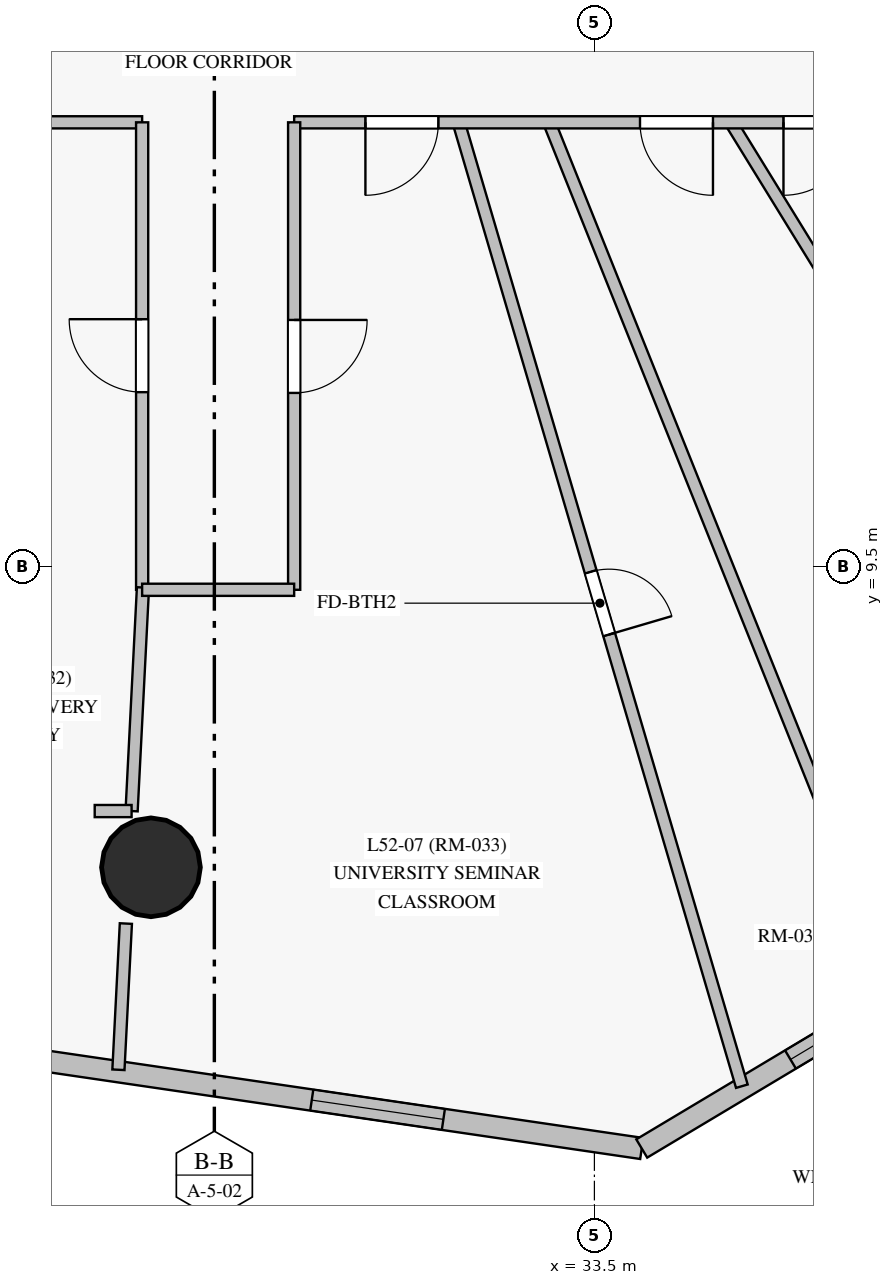
"""IFC4 building model, lengths in metres.
Left out: names, types, materials, properties, quantities, classifications, styles, units other than length and angle.
Written with IfcOpenShell. Run it as: python <this file> out.ifc"""

import sys

from ifc_helpers import new_model, si_unit, direction, frame, frame_2d, origin, origin_with_axes, origin_2d, place, context, subcontext, project, spatial, rectangle, circle, extrude, source, transform, mapped, element, fill, save


model = new_model("IFC4")
c1 = context("Model", 3, precision=1e-05, world=origin(), true_north=direction((0.0, 1.0)))
c2 = subcontext(c1, "Body", "Model", "MODEL_VIEW")
j1 = project(units=[si_unit("LENGTHUNIT", "METRE"), si_unit("PLANEANGLEUNIT", "RADIAN")], contexts=[c1])
p1 = place(None, origin())
s1 = spatial("IfcSite", under=j1, at=p1, CompositionType="ELEMENT")
p2 = place(p1, origin())
s2 = spatial("IfcBuilding", under=s1, at=p2, CompositionType="ELEMENT")
p3 = place(p2, frame((0.0, 0.0, 180.95)))
s3 = spatial("IfcBuildingStorey", under=s2, at=p3, CompositionType="ELEMENT", Elevation=180.95)
m1 = source(origin_with_axes(), c2, "Body", "SweptSolid", [
    extrude(circle(Radius=0.65, at=origin_2d()), origin(), (0.0, 0.0, 1.0), 3.05),
])
p4 = place(p3, frame((27.666, 5.549, 0.0), z_axis=(0.0, 0.0, 1.0), x_axis=(1.0, 0.0, 0.0)))
e1 = element("IfcColumn", 1, at=p4, inside=s3, PredefinedType="COLUMN", context=c2, shape_type="MappedRepresentation", body=[
    mapped(m1, transform((0.0, 0.0, 0.0), scale=1.0)),
])
p5 = place(p3, frame((21.422, 3.713, 0.0), z_axis=(0.0, 0.0, 1.0), x_axis=(0.989415023511, -0.145113442696, 0.0)))
e2 = element("IfcWall", 2, at=p5, inside=s3, PredefinedType="SOLIDWALL", context=c2, shape_type="SweptSolid", body=[
    extrude(rectangle(XDim=12.837, YDim=0.28, at=frame_2d((6.418, 0.0))), origin(), (0.0, 0.0, 1.0), 2.825),
])
p6 = place(p5, frame((2.718, 0.0, 0.85)))
e3 = element("IfcOpeningElement", 3, at=p6, cuts=e2, PredefinedType="OPENING", context=c2, shape_type="SweptSolid", body=[
    extrude(rectangle(XDim=1.75, YDim=1.65, at=frame_2d((0.875, 0.825))), frame((0.0, 0.15, 0.0), z_axis=(0.0, -1.0, 0.0), x_axis=(1.0, 0.0, 0.0)), (0.0, 0.0, 1.0), 0.3),
])
p7 = place(p5, frame((8.449, 0.0, 0.85)))
e4 = element("IfcOpeningElement", 4, at=p7, cuts=e2, PredefinedType="OPENING", context=c2, shape_type="SweptSolid", body=[
    extrude(rectangle(XDim=1.75, YDim=1.65, at=frame_2d((0.875, 0.825))), frame((0.0, 0.15, 0.0), z_axis=(0.0, -1.0, 0.0), x_axis=(1.0, 0.0, 0.0)), (0.0, 0.0, 1.0), 0.3),
])
p8 = place(p3, frame((34.123, 1.85, 0.0), z_axis=(0.0, 0.0, 1.0), x_axis=(0.858226046781, 0.513271909057, 0.0)))
e5 = element("IfcWall", 5, at=p8, inside=s3, PredefinedType="SOLIDWALL", context=c2, shape_type="SweptSolid", body=[
    extrude(rectangle(XDim=10.037, YDim=0.28, at=frame_2d((5.019, 0.0))), origin(), (0.0, 0.0, 1.0), 2.825),
])
p9 = place(p8, frame((2.28, 0.0, 0.85)))
e6 = element("IfcOpeningElement", 6, at=p9, cuts=e5, PredefinedType="OPENING", context=c2, shape_type="SweptSolid", body=[
    extrude(rectangle(XDim=0.95, YDim=1.5, at=frame_2d((0.475, 0.75))), frame((0.0, 0.15, 0.0), z_axis=(0.0, -1.0, 0.0), x_axis=(1.0, 0.0, 0.0)), (0.0, 0.0, 1.0), 0.3),
])
p10 = place(p8, frame((5.139, 0.0, 0.85)))
e7 = element("IfcOpeningElement", 7, at=p10, cuts=e5, PredefinedType="OPENING", context=c2, shape_type="SweptSolid", body=[
    extrude(rectangle(XDim=1.75, YDim=1.65, at=frame_2d((0.875, 0.825))), frame((0.0, 0.15, 0.0), z_axis=(0.0, -1.0, 0.0), x_axis=(1.0, 0.0, 0.0)), (0.0, 0.0, 1.0), 0.3),
])
p11 = place(p8, frame((8.552, 0.0, 0.85)))
e8 = element("IfcOpeningElement", 8, at=p11, cuts=e5, PredefinedType="OPENING", context=c2, shape_type="SweptSolid", body=[
    extrude(rectangle(XDim=0.95, YDim=1.5, at=frame_2d((0.475, 0.75))), frame((0.0, 0.15, 0.0), z_axis=(0.0, -1.0, 0.0), x_axis=(1.0, 0.0, 0.0)), (0.0, 0.0, 1.0), 0.3),
])
p12 = place(p3, frame((31.705, 15.379, 0.0), z_axis=(0.0, 0.0, 1.0), x_axis=(0.281920857813, -0.959437663389, 0.0)))
e9 = element("IfcWall", 9, at=p12, inside=s3, PredefinedType="PARTITIONING", context=c2, shape_type="SweptSolid", body=[
    extrude(rectangle(XDim=13.247, YDim=0.16, at=frame_2d((6.624, 0.0))), origin(), (0.0, 0.0, 1.0), 2.825),
])
p13 = place(p12, frame((6.193, 0.0, 0.0)))
e10 = element("IfcOpeningElement", 10, at=p13, cuts=e9, PredefinedType="OPENING", context=c2, shape_type="SweptSolid", body=[
    extrude(rectangle(XDim=0.86, YDim=2.04, at=frame_2d((0.43, 1.02))), frame((0.0, 0.09, 0.0), z_axis=(0.0, -1.0, 0.0), x_axis=(1.0, 0.0, 0.0)), (0.0, 0.0, 1.0), 0.18),
])
p14 = place(p3, frame((32.894, 15.378, 0.0), z_axis=(0.0, 0.0, 1.0), x_axis=(0.372061025982, -0.928208270242, 0.0)))
e11 = element("IfcWall", 11, at=p14, inside=s3, PredefinedType="PARTITIONING", context=c2, shape_type="SweptSolid", body=[
    extrude(rectangle(XDim=12.368, YDim=0.16, at=frame_2d((6.184, 0.0))), origin(), (0.0, 0.0, 1.0), 2.825),
])
p15 = place(p3, frame((35.279, 15.375, 0.0), z_axis=(0.0, 0.0, 1.0), x_axis=(0.524324221798, -0.851518708213, 0.0)))
e12 = element("IfcWall", 12, at=p15, inside=s3, PredefinedType="PARTITIONING", context=c2, shape_type="SweptSolid", body=[
    extrude(rectangle(XDim=10.99, YDim=0.16, at=frame_2d((5.495, 0.0))), origin(), (0.0, 0.0, 1.0), 2.825),
])
p16 = place(p3, frame((27.55, 15.35, 0.0), z_axis=(0.0, 0.0, 1.0), x_axis=(-1.0, 0.0, 0.0)))
e13 = element("IfcWall", 13, at=p16, inside=s3, PredefinedType="PARTITIONING", context=c2, shape_type="SweptSolid", body=[
    extrude(rectangle(XDim=10.85, YDim=0.16, at=frame_2d((5.425, 0.0))), origin(), (0.0, 0.0, 1.0), 2.375),
])
p17 = place(p16, frame((4.95, 0.0, 0.0)))
e14 = element("IfcOpeningElement", 14, at=p17, cuts=e13, PredefinedType="OPENING", context=c2, shape_type="SweptSolid", body=[
    extrude(rectangle(XDim=0.95, YDim=2.15, at=frame_2d((0.475, 1.075))), frame((0.0, 0.09, 0.0), z_axis=(0.0, -1.0, 0.0), x_axis=(1.0, 0.0, 0.0)), (0.0, 0.0, 1.0), 0.18),
])
p18 = place(p16, frame((2.683, 0.0, 0.0)))
e15 = element("IfcOpeningElement", 15, at=p18, cuts=e13, PredefinedType="OPENING", context=c2, shape_type="SweptSolid", body=[
    extrude(rectangle(XDim=0.96, YDim=2.15, at=frame_2d((0.48, 1.075))), frame((0.0, 0.09, 0.0), z_axis=(0.0, -1.0, 0.0), x_axis=(1.0, 0.0, 0.0)), (0.0, 0.0, 1.0), 0.18),
])
p19 = place(p3, frame((40.2, 15.35, 0.0), z_axis=(0.0, 0.0, 1.0), x_axis=(-1.0, 0.0, 0.0)))
e16 = element("IfcWall", 16, at=p19, inside=s3, PredefinedType="PARTITIONING", context=c2, shape_type="SweptSolid", body=[
    extrude(rectangle(XDim=10.65, YDim=0.16, at=frame_2d((5.325, 0.0))), origin(), (0.0, 0.0, 1.0), 2.275),
])
p20 = place(p19, frame((8.752, 0.0, 0.0)))
e17 = element("IfcOpeningElement", 17, at=p20, cuts=e16, PredefinedType="OPENING", context=c2, shape_type="SweptSolid", body=[
    extrude(rectangle(XDim=0.96, YDim=2.15, at=frame_2d((0.48, 1.075))), frame((0.0, 0.09, 0.0), z_axis=(0.0, -1.0, 0.0), x_axis=(1.0, 0.0, 0.0)), (0.0, 0.0, 1.0), 0.18),
])
p21 = place(p19, frame((5.14, 0.0, 0.0)))
e18 = element("IfcOpeningElement", 18, at=p21, cuts=e16, PredefinedType="OPENING", context=c2, shape_type="SweptSolid", body=[
    extrude(rectangle(XDim=0.96, YDim=2.15, at=frame_2d((0.48, 1.075))), frame((0.0, 0.09, 0.0), z_axis=(0.0, -1.0, 0.0), x_axis=(1.0, 0.0, 0.0)), (0.0, 0.0, 1.0), 0.18),
])
p22 = place(p19, frame((3.252, 0.0, 0.0)))
e19 = element("IfcOpeningElement", 19, at=p22, cuts=e16, PredefinedType="OPENING", context=c2, shape_type="SweptSolid", body=[
    extrude(rectangle(XDim=0.96, YDim=2.15, at=frame_2d((0.48, 1.075))), frame((0.0, 0.09, 0.0), z_axis=(0.0, -1.0, 0.0), x_axis=(1.0, 0.0, 0.0)), (0.0, 0.0, 1.0), 0.18),
])
p23 = place(p19, frame((0.867, 0.0, 0.0)))
e20 = element("IfcOpeningElement", 20, at=p23, cuts=e16, PredefinedType="OPENING", context=c2, shape_type="SweptSolid", body=[
    extrude(rectangle(XDim=0.86, YDim=2.04, at=frame_2d((0.43, 1.02))), frame((0.0, 0.09, 0.0), z_axis=(0.0, -1.0, 0.0), x_axis=(1.0, 0.0, 0.0)), (0.0, 0.0, 1.0), 0.18),
])
p24 = place(p3, frame((29.55, 15.35, 0.0), z_axis=(0.0, 0.0, 1.0), x_axis=(0.0, -1.0, 0.0)))
e21 = element("IfcWall", 21, at=p24, inside=s3, PredefinedType="PARTITIONING", context=c2, shape_type="SweptSolid", body=[
    extrude(rectangle(XDim=6.15, YDim=0.16, at=frame_2d((3.075, 0.0))), origin(), (0.0, 0.0, 1.0), 2.825),
])
p25 = place(p24, frame((2.6, 0.0, 0.0)))
e22 = element("IfcOpeningElement", 22, at=p25, cuts=e21, PredefinedType="OPENING", context=c2, shape_type="SweptSolid", body=[
    extrude(rectangle(XDim=0.96, YDim=2.15, at=frame_2d((0.48, 1.075))), frame((0.0, 0.09, 0.0), z_axis=(0.0, -1.0, 0.0), x_axis=(1.0, 0.0, 0.0)), (0.0, 0.0, 1.0), 0.18),
])
p26 = place(p3, frame((27.55, 9.2, 0.0), z_axis=(0.0, 0.0, 1.0), x_axis=(0.0, 1.0, 0.0)))
e23 = element("IfcWall", 23, at=p26, inside=s3, PredefinedType="PARTITIONING", context=c2, shape_type="SweptSolid", body=[
    extrude(rectangle(XDim=6.15, YDim=0.16, at=frame_2d((3.075, 0.0))), origin(), (0.0, 0.0, 1.0), 2.275),
])
p27 = place(p26, frame((2.6, 0.0, 0.0)))
e24 = element("IfcOpeningElement", 24, at=p27, cuts=e23, PredefinedType="OPENING", context=c2, shape_type="SweptSolid", body=[
    extrude(rectangle(XDim=0.96, YDim=2.15, at=frame_2d((0.48, 1.075))), frame((0.0, 0.09, 0.0), z_axis=(0.0, -1.0, 0.0), x_axis=(1.0, 0.0, 0.0)), (0.0, 0.0, 1.0), 0.18),
])
p28 = place(p3, frame((27.561, 9.23, 0.0), z_axis=(0.0, 0.0, 1.0), x_axis=(-0.050822498854, -0.998707701788, 0.0)))
e25 = element("IfcWall", 25, at=p28, inside=s3, PredefinedType="PARTITIONING", context=c2, shape_type="SweptSolid", body=[
    extrude(rectangle(XDim=2.945, YDim=0.16, at=frame_2d((1.472, 0.0))), origin(), (0.0, 0.0, 1.0), 2.275),
])
p29 = place(p3, frame((29.55, 9.2, 0.0), z_axis=(0.0, 0.0, 1.0), x_axis=(-1.0, 0.0, 0.0)))
e26 = element("IfcWall", 26, at=p29, inside=s3, PredefinedType="PARTITIONING", context=c2, shape_type="SweptSolid", body=[
    extrude(rectangle(XDim=2.0, YDim=0.16, at=frame_2d((1.0, 0.0))), origin(), (0.0, 0.0, 1.0), 2.495),
])
p30 = place(p3, frame((27.336, 4.809, 0.0), z_axis=(0.0, 0.0, 1.0), x_axis=(-0.050828995537, -0.998707371162, 0.0)))
e27 = element("IfcWall", 27, at=p30, inside=s3, PredefinedType="PARTITIONING", context=c2, shape_type="SweptSolid", body=[
    extrude(rectangle(XDim=1.926, YDim=0.16, at=frame_2d((0.963, 0.0))), origin(), (0.0, 0.0, 1.0), 2.825),
])
p31 = place(p3, frame((27.411, 6.289, 0.0), z_axis=(0.0, 0.0, 1.0), x_axis=(-1.0, 0.0, 0.0)))
e28 = element("IfcWall", 28, at=p31, inside=s3, PredefinedType="PARTITIONING", context=c2, shape_type="SweptSolid", body=[
    extrude(rectangle(XDim=0.485, YDim=0.16, at=frame_2d((0.243, 0.0))), origin(), (0.0, 0.0, 1.0), 2.275),
])
m2 = source(origin_with_axes(), c2, "Body", "SweptSolid", [
    extrude(rectangle(XDim=1.75, YDim=1.65, at=frame_2d((0.875, 0.825))), frame((0.0, 0.03, 0.0), z_axis=(0.0, -1.0, 0.0), x_axis=(1.0, 0.0, 0.0)), (0.0, 0.0, 1.0), 0.06),
])
p32 = place(p7, origin())
e29 = element("IfcWindow", 29, at=p32, inside=s3, PartitioningType="SINGLE_PANEL", PredefinedType="WINDOW", context=c2, shape_type="MappedRepresentation", body=[
    mapped(m2, transform((0.0, 0.0, 0.0), scale=1.0)),
])
fill(e4, e29)
m3 = source(origin_with_axes(), c2, "Body", "SweptSolid", [
    extrude(rectangle(XDim=0.95, YDim=1.5, at=frame_2d((0.475, 0.75))), frame((0.0, 0.03, 0.0), z_axis=(0.0, -1.0, 0.0), x_axis=(1.0, 0.0, 0.0)), (0.0, 0.0, 1.0), 0.06),
])
p33 = place(p9, origin())
e30 = element("IfcWindow", 30, at=p33, inside=s3, PartitioningType="SINGLE_PANEL", PredefinedType="WINDOW", context=c2, shape_type="MappedRepresentation", body=[
    mapped(m3, transform((0.0, 0.0, 0.0), scale=1.0)),
])
fill(e6, e30)
m4 = source(origin_with_axes(), c2, "Body", "SweptSolid", [
    extrude(rectangle(XDim=0.96, YDim=2.15, at=frame_2d((0.48, 1.075))), frame((0.0, 0.025, 0.0), z_axis=(0.0, -1.0, 0.0), x_axis=(1.0, 0.0, 0.0)), (0.0, 0.0, 1.0), 0.05),
])
p34 = place(p27, origin())
e31 = element("IfcDoor", 31, at=p34, inside=s3, OperationType="SINGLE_SWING_RIGHT", PredefinedType="DOOR", context=c2, shape_type="MappedRepresentation", body=[
    mapped(m4, transform((0.0, 0.0, 0.0), scale=1.0)),
])
fill(e24, e31)
p35 = place(p25, origin())
e32 = element("IfcDoor", 32, at=p35, inside=s3, OperationType="SINGLE_SWING_LEFT", PredefinedType="DOOR", context=c2, shape_type="MappedRepresentation", body=[
    mapped(m4, transform((0.0, 0.0, 0.0), scale=1.0)),
])
fill(e22, e32)
p36 = place(p20, origin())
e33 = element("IfcDoor", 33, at=p36, inside=s3, OperationType="SINGLE_SWING_RIGHT", PredefinedType="DOOR", context=c2, shape_type="MappedRepresentation", body=[
    mapped(m4, transform((0.0, 0.0, 0.0), scale=1.0)),
])
fill(e17, e33)
p37 = place(p21, origin())
e34 = element("IfcDoor", 34, at=p37, inside=s3, OperationType="SINGLE_SWING_LEFT", PredefinedType="DOOR", context=c2, shape_type="MappedRepresentation", body=[
    mapped(m4, transform((0.0, 0.0, 0.0), scale=1.0)),
])
fill(e18, e34)
p38 = place(p22, origin())
e35 = element("IfcDoor", 35, at=p38, inside=s3, OperationType="SINGLE_SWING_RIGHT", PredefinedType="DOOR", context=c2, shape_type="MappedRepresentation", body=[
    mapped(m4, transform((0.0, 0.0, 0.0), scale=1.0)),
])
fill(e19, e35)
m5 = source(origin_with_axes(), c2, "Body", "SweptSolid", [
    extrude(rectangle(XDim=0.86, YDim=2.04, at=frame_2d((0.43, 1.02))), frame((0.0, 0.025, 0.0), z_axis=(0.0, -1.0, 0.0), x_axis=(1.0, 0.0, 0.0)), (0.0, 0.0, 1.0), 0.05),
])
p39 = place(p13, origin())
e36 = element("IfcDoor", 36, at=p39, inside=s3, OperationType="SINGLE_SWING_RIGHT", PredefinedType="DOOR", context=c2, shape_type="MappedRepresentation", body=[
    mapped(m5, transform((0.0, 0.0, 0.0), scale=1.0)),
])
fill(e10, e36)
save(model, sys.argv[1])
